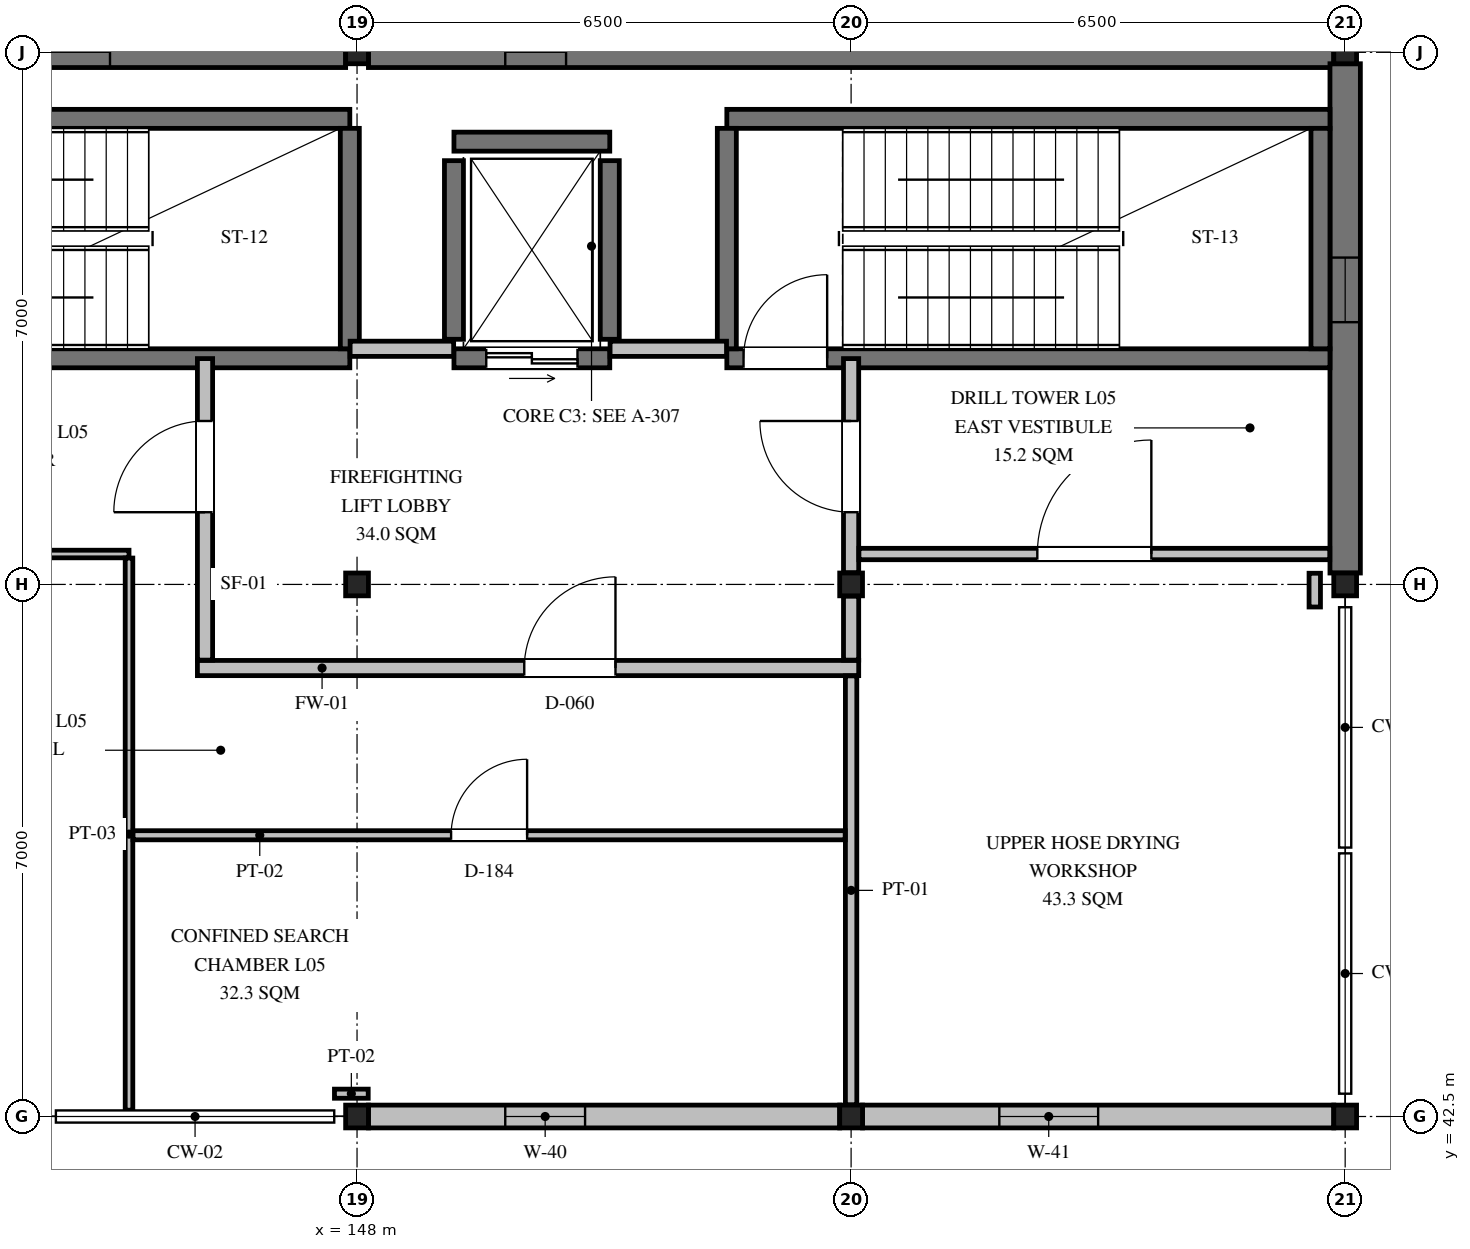
"""IFC4 building model, lengths in metres.
Left out: names, types, materials, properties, quantities, classifications, styles, units other than length and angle.
Written with IfcOpenShell. Run it as: python <this file> out.ifc"""

import sys

from ifc_helpers import new_model, si_unit, direction, frame, frame_2d, origin, origin_2d, place, context, subcontext, project, spatial, rectangle, i_section, extrude, element, fill, save


model = new_model("IFC4")
c1 = context("Model", 3, precision=1e-05, world=origin(), true_north=direction((0.0, 1.0)))
c2 = subcontext(c1, "Body", "Model", "MODEL_VIEW")
j1 = project(units=[si_unit("LENGTHUNIT", "METRE"), si_unit("PLANEANGLEUNIT", "RADIAN")], contexts=[c1])
p1 = place(None, origin())
s1 = spatial("IfcSite", under=j1, at=p1, CompositionType="ELEMENT")
p2 = place(p1, origin())
s2 = spatial("IfcBuilding", under=s1, at=p2, CompositionType="ELEMENT")
p3 = place(p2, frame((0.0, 0.0, 18.45)))
s3 = spatial("IfcBuildingStorey", under=s2, at=p3, CompositionType="ELEMENT", Elevation=18.45)
for number, where, z_axis, x_axis in (
    (1, (148.0, 42.5, 0.0), (0.0, 0.0, 1.0), (1.0, 0.0, 0.0)),
    (2, (148.0, 49.5, 0.0), (0.0, 0.0, 1.0), (1.0, 0.0, 0.0)),
    (3, (148.0, 56.5, 0.0), (0.0, 0.0, 1.0), (1.0, 0.0, 0.0)),
    (4, (154.5, 42.5, 0.0), (0.0, 0.0, 1.0), (1.0, 0.0, 0.0)),
    (5, (154.5, 49.5, 0.0), (0.0, 0.0, 1.0), (1.0, 0.0, 0.0)),
    (6, (161.0, 42.5, 0.0), (0.0, 0.0, 1.0), (1.0, 0.0, 0.0)),
    (7, (161.0, 49.5, 0.0), (0.0, 0.0, 1.0), (1.0, 0.0, 0.0)),
    (8, (161.0, 56.5, 0.0), (0.0, 0.0, 1.0), (1.0, 0.0, 0.0)),
):
    element("IfcColumn", number, at=place(p3, frame(where, z_axis=z_axis, x_axis=x_axis)), inside=s3, PredefinedType="COLUMN", context=c2, shape_type="SweptSolid", body=[
        extrude(i_section(OverallWidth=0.3, OverallDepth=0.3, WebThickness=0.01, FlangeThickness=0.015, FilletRadius=0.018, at=origin_2d()), origin(), (0.0, 0.0, 1.0), 4.2),
    ])
p4 = place(p3, frame((140.15, 56.5, 0.0), z_axis=(0.0, 0.0, 1.0), x_axis=(1.0, 0.0, 0.0)))
e9 = element("IfcWall", 9, at=p4, inside=s3, PredefinedType="SHEAR", context=c2, shape_type="SweptSolid", body=[
    extrude(rectangle(XDim=7.7, YDim=0.4, at=frame_2d((3.85, 0.0))), origin(), (0.0, 0.0, 1.0), 4.0),
])
p5 = place(p4, frame((1.8, 0.0, 0.9)))
e10 = element("IfcOpeningElement", 10, at=p5, cuts=e9, PredefinedType="OPENING", context=c2, shape_type="SweptSolid", body=[
    extrude(rectangle(XDim=2.8, YDim=1.2, at=frame_2d((1.4, 0.6))), frame((0.0, 0.21, 0.0), z_axis=(0.0, -1.0, 0.0), x_axis=(1.0, 0.0, 0.0)), (0.0, 0.0, 1.0), 0.42),
])
p6 = place(p3, frame((148.15, 56.5, 0.0), z_axis=(0.0, 0.0, 1.0), x_axis=(1.0, 0.0, 0.0)))
e11 = element("IfcWall", 11, at=p6, inside=s3, PredefinedType="SHEAR", context=c2, shape_type="SweptSolid", body=[
    extrude(rectangle(XDim=12.7, YDim=0.4, at=frame_2d((6.35, 0.0))), origin(), (0.0, 0.0, 1.0), 4.0),
])
p7 = place(p6, frame((1.8, 0.0, 0.9)))
e12 = element("IfcOpeningElement", 12, at=p7, cuts=e11, PredefinedType="OPENING", context=c2, shape_type="SweptSolid", body=[
    extrude(rectangle(XDim=0.8, YDim=1.3, at=frame_2d((0.4, 0.65))), frame((0.0, 0.21, 0.0), z_axis=(0.0, -1.0, 0.0), x_axis=(1.0, 0.0, 0.0)), (0.0, 0.0, 1.0), 0.42),
])
p8 = place(p3, frame((161.0, 49.65, 0.0), z_axis=(0.0, 0.0, 1.0), x_axis=(0.0, 1.0, 0.0)))
e13 = element("IfcWall", 13, at=p8, inside=s3, PredefinedType="SHEAR", context=c2, shape_type="SweptSolid", body=[
    extrude(rectangle(XDim=6.7, YDim=0.4, at=frame_2d((3.35, 0.0))), origin(), (0.0, 0.0, 1.0), 4.0),
])
p9 = place(p8, frame((3.3, 0.0, 1.1)))
e14 = element("IfcOpeningElement", 14, at=p9, cuts=e13, PredefinedType="OPENING", context=c2, shape_type="SweptSolid", body=[
    extrude(rectangle(XDim=0.85, YDim=0.85, at=frame_2d((0.425, 0.425))), frame((0.0, 0.21, 0.0), z_axis=(0.0, -1.0, 0.0), x_axis=(1.0, 0.0, 0.0)), (0.0, 0.0, 1.0), 0.42),
])
p10 = place(p3, frame((148.15, 42.5, 0.0), z_axis=(0.0, 0.0, 1.0), x_axis=(1.0, 0.0, 0.0)))
e15 = element("IfcWall", 15, at=p10, inside=s3, PredefinedType="SOLIDWALL", context=c2, shape_type="SweptSolid", body=[
    extrude(rectangle(XDim=6.2, YDim=0.3, at=frame_2d((3.1, 0.0))), origin(), (0.0, 0.0, 1.0), 3.494),
])
p11 = place(p10, frame((1.8, 0.0, 0.9)))
e16 = element("IfcOpeningElement", 16, at=p11, cuts=e15, PredefinedType="OPENING", context=c2, shape_type="SweptSolid", body=[
    extrude(rectangle(XDim=1.05, YDim=1.3, at=frame_2d((0.525, 0.65))), frame((0.0, 0.16, 0.0), z_axis=(0.0, -1.0, 0.0), x_axis=(1.0, 0.0, 0.0)), (0.0, 0.0, 1.0), 0.32),
])
p12 = place(p3, frame((154.65, 42.5, 0.0), z_axis=(0.0, 0.0, 1.0), x_axis=(1.0, 0.0, 0.0)))
e17 = element("IfcWall", 17, at=p12, inside=s3, PredefinedType="SOLIDWALL", context=c2, shape_type="SweptSolid", body=[
    extrude(rectangle(XDim=6.2, YDim=0.3, at=frame_2d((3.1, 0.0))), origin(), (0.0, 0.0, 1.0), 3.554),
])
p13 = place(p12, frame((1.8, 0.0, 0.9)))
e18 = element("IfcOpeningElement", 18, at=p13, cuts=e17, PredefinedType="OPENING", context=c2, shape_type="SweptSolid", body=[
    extrude(rectangle(XDim=1.3, YDim=1.3, at=frame_2d((0.65, 0.65))), frame((0.0, 0.16, 0.0), z_axis=(0.0, -1.0, 0.0), x_axis=(1.0, 0.0, 0.0)), (0.0, 0.0, 1.0), 0.32),
])
p14 = place(p3, frame((140.095, 52.475, 0.0), z_axis=(0.0, 0.0, 1.0), x_axis=(1.0, 0.0, 0.0)))
e19 = element("IfcWall", 19, at=p14, inside=s3, PredefinedType="SHEAR", context=c2, shape_type="SweptSolid", body=[
    extrude(rectangle(XDim=7.81, YDim=0.25, at=frame_2d((3.905, 0.0))), origin(), (0.0, 0.0, 1.0), 4.0),
])
p15 = place(p14, frame((0.22, 0.0, 0.0)))
e20 = element("IfcOpeningElement", 20, at=p15, cuts=e19, PredefinedType="OPENING", context=c2, shape_type="SweptSolid", body=[
    extrude(rectangle(XDim=1.1, YDim=2.15, at=frame_2d((0.55, 1.075))), frame((0.0, 0.135, 0.0), z_axis=(0.0, -1.0, 0.0), x_axis=(1.0, 0.0, 0.0)), (0.0, 0.0, 1.0), 0.27),
])
p16 = place(p3, frame((140.095, 55.625, 0.0), z_axis=(0.0, 0.0, 1.0), x_axis=(1.0, 0.0, 0.0)))
e21 = element("IfcWall", 21, at=p16, inside=s3, PredefinedType="SHEAR", context=c2, shape_type="SweptSolid", body=[
    extrude(rectangle(XDim=7.81, YDim=0.25, at=frame_2d((3.905, 0.0))), origin(), (0.0, 0.0, 1.0), 4.0),
])
p17 = place(p3, frame((147.905, 52.6, 0.0), z_axis=(0.0, 0.0, 1.0), x_axis=(0.0, 1.0, 0.0)))
e22 = element("IfcWall", 22, at=p17, inside=s3, PredefinedType="SHEAR", context=c2, shape_type="SweptSolid", body=[
    extrude(rectangle(XDim=2.9, YDim=0.25, at=frame_2d((1.45, 0.0))), origin(), (0.0, 0.0, 1.0), 4.0),
])
p18 = place(p3, frame((152.865, 52.475, 0.0), z_axis=(0.0, 0.0, 1.0), x_axis=(1.0, 0.0, 0.0)))
e23 = element("IfcWall", 23, at=p18, inside=s3, PredefinedType="SHEAR", context=c2, shape_type="SweptSolid", body=[
    extrude(rectangle(XDim=7.935, YDim=0.25, at=frame_2d((3.968, 0.0))), origin(), (0.0, 0.0, 1.0), 4.0),
])
p19 = place(p18, frame((0.22, 0.0, 0.0)))
e24 = element("IfcOpeningElement", 24, at=p19, cuts=e23, PredefinedType="OPENING", context=c2, shape_type="SweptSolid", body=[
    extrude(rectangle(XDim=1.1, YDim=2.15, at=frame_2d((0.55, 1.075))), frame((0.0, 0.135, 0.0), z_axis=(0.0, -1.0, 0.0), x_axis=(1.0, 0.0, 0.0)), (0.0, 0.0, 1.0), 0.27),
])
p20 = place(p3, frame((152.865, 55.625, 0.0), z_axis=(0.0, 0.0, 1.0), x_axis=(1.0, 0.0, 0.0)))
e25 = element("IfcWall", 25, at=p20, inside=s3, PredefinedType="SHEAR", context=c2, shape_type="SweptSolid", body=[
    extrude(rectangle(XDim=7.935, YDim=0.25, at=frame_2d((3.968, 0.0))), origin(), (0.0, 0.0, 1.0), 4.0),
])
for number, where, z_axis, x_axis in (
    (26, (152.865, 52.6, 0.0), (0.0, 0.0, 1.0), (0.0, 1.0, 0.0)),
    (27, (160.675, 52.6, 0.0), (0.0, 0.0, 1.0), (0.0, 1.0, 0.0)),
):
    element("IfcWall", number, at=place(p3, frame(where, z_axis=z_axis, x_axis=x_axis)), inside=s3, PredefinedType="SHEAR", context=c2, shape_type="SweptSolid", body=[
        extrude(rectangle(XDim=2.9, YDim=0.25, at=frame_2d((1.45, 0.0))), origin(), (0.0, 0.0, 1.0), 4.0),
    ])
p21 = place(p3, frame((149.275, 52.475, 0.0), z_axis=(0.0, 0.0, 1.0), x_axis=(1.0, 0.0, 0.0)))
e28 = element("IfcWall", 28, at=p21, inside=s3, PredefinedType="SHEAR", context=c2, shape_type="SweptSolid", body=[
    extrude(rectangle(XDim=2.05, YDim=0.25, at=frame_2d((1.025, 0.0))), origin(), (0.0, 0.0, 1.0), 4.0),
])
p22 = place(p21, frame((0.425, 0.0, 0.0)))
e29 = element("IfcOpeningElement", 29, at=p22, cuts=e28, PredefinedType="OPENING", context=c2, shape_type="SweptSolid", body=[
    extrude(rectangle(XDim=1.2, YDim=2.15, at=frame_2d((0.6, 1.075))), frame((0.0, 0.135, 0.0), z_axis=(0.0, -1.0, 0.0), x_axis=(1.0, 0.0, 0.0)), (0.0, 0.0, 1.0), 0.27),
])
p23 = place(p3, frame((149.275, 55.325, 0.0), z_axis=(0.0, 0.0, 1.0), x_axis=(1.0, 0.0, 0.0)))
e30 = element("IfcWall", 30, at=p23, inside=s3, PredefinedType="SHEAR", context=c2, shape_type="SweptSolid", body=[
    extrude(rectangle(XDim=2.05, YDim=0.25, at=frame_2d((1.025, 0.0))), origin(), (0.0, 0.0, 1.0), 4.0),
])
for number, where, z_axis, x_axis in (
    (31, (149.275, 52.725, 0.0), (0.0, 0.0, 1.0), (0.0, 1.0, 0.0)),
    (32, (151.325, 52.725, 0.0), (0.0, 0.0, 1.0), (0.0, 1.0, 0.0)),
):
    element("IfcWall", number, at=place(p3, frame(where, z_axis=z_axis, x_axis=x_axis)), inside=s3, PredefinedType="SHEAR", context=c2, shape_type="SweptSolid", body=[
        extrude(rectangle(XDim=2.35, YDim=0.25, at=frame_2d((1.175, 0.0))), origin(), (0.0, 0.0, 1.0), 4.0),
    ])
p24 = place(p3, frame((147.909, 52.6, 0.0), z_axis=(0.0, 0.0, 1.0), x_axis=(1.0, 0.0, 0.0)))
e33 = element("IfcWall", 33, at=p24, inside=s3, PredefinedType="PARTITIONING", context=c2, shape_type="SweptSolid", body=[
    extrude(rectangle(XDim=1.362, YDim=0.2, at=frame_2d((0.681, 0.0))), origin(), (0.0, 0.0, 1.0), 4.0),
])
p25 = place(p3, frame((151.329, 52.6, 0.0), z_axis=(0.0, 0.0, 1.0), x_axis=(1.0, 0.0, 0.0)))
e34 = element("IfcWall", 34, at=p25, inside=s3, PredefinedType="PARTITIONING", context=c2, shape_type="SweptSolid", body=[
    extrude(rectangle(XDim=1.532, YDim=0.2, at=frame_2d((0.766, 0.0))), origin(), (0.0, 0.0, 1.0), 4.0),
])
p26 = place(p3, frame((145.9, 48.4, 0.0), z_axis=(0.0, 0.0, 1.0), x_axis=(1.0, 0.0, 0.0)))
e35 = element("IfcWall", 35, at=p26, inside=s3, PredefinedType="PARTITIONING", context=c2, shape_type="SweptSolid", body=[
    extrude(rectangle(XDim=8.7, YDim=0.2, at=frame_2d((4.35, 0.0))), origin(), (0.0, 0.0, 1.0), 4.0),
])
p27 = place(p26, frame((4.3, 0.0, 0.0)))
e36 = element("IfcOpeningElement", 36, at=p27, cuts=e35, PredefinedType="OPENING", context=c2, shape_type="SweptSolid", body=[
    extrude(rectangle(XDim=1.2, YDim=2.15, at=frame_2d((0.6, 1.075))), frame((0.0, 0.11, 0.0), z_axis=(0.0, -1.0, 0.0), x_axis=(1.0, 0.0, 0.0)), (0.0, 0.0, 1.0), 0.22),
])
p28 = place(p3, frame((146.0, 48.504, 0.0), z_axis=(0.0, 0.0, 1.0), x_axis=(0.0, 1.0, 0.0)))
e37 = element("IfcWall", 37, at=p28, inside=s3, PredefinedType="PARTITIONING", context=c2, shape_type="SweptSolid", body=[
    extrude(rectangle(XDim=3.967, YDim=0.2, at=frame_2d((1.983, 0.0))), origin(), (0.0, 0.0, 1.0), 4.0),
])
p29 = place(p28, frame((1.946, 0.0, 0.0)))
e38 = element("IfcOpeningElement", 38, at=p29, cuts=e37, PredefinedType="OPENING", context=c2, shape_type="SweptSolid", body=[
    extrude(rectangle(XDim=1.2, YDim=2.15, at=frame_2d((0.6, 1.075))), frame((0.0, 0.11, 0.0), z_axis=(0.0, -1.0, 0.0), x_axis=(1.0, 0.0, 0.0)), (0.0, 0.0, 1.0), 0.22),
])
p30 = place(p3, frame((154.5, 48.504, 0.0), z_axis=(0.0, 0.0, 1.0), x_axis=(0.0, 1.0, 0.0)))
e39 = element("IfcWall", 39, at=p30, inside=s3, PredefinedType="PARTITIONING", context=c2, shape_type="SweptSolid", body=[
    extrude(rectangle(XDim=0.842, YDim=0.2, at=frame_2d((0.421, 0.0))), origin(), (0.0, 0.0, 1.0), 3.604),
])
p31 = place(p3, frame((154.5, 49.654, 0.0), z_axis=(0.0, 0.0, 1.0), x_axis=(0.0, 1.0, 0.0)))
e40 = element("IfcWall", 40, at=p31, inside=s3, PredefinedType="PARTITIONING", context=c2, shape_type="SweptSolid", body=[
    extrude(rectangle(XDim=2.817, YDim=0.2, at=frame_2d((1.408, 0.0))), origin(), (0.0, 0.0, 1.0), 4.0),
])
p32 = place(p31, frame((0.796, 0.0, 0.0)))
e41 = element("IfcOpeningElement", 41, at=p32, cuts=e40, PredefinedType="OPENING", context=c2, shape_type="SweptSolid", body=[
    extrude(rectangle(XDim=1.2, YDim=2.15, at=frame_2d((0.6, 1.075))), frame((0.0, 0.11, 0.0), z_axis=(0.0, -1.0, 0.0), x_axis=(1.0, 0.0, 0.0)), (0.0, 0.0, 1.0), 0.22),
])
p33 = place(p3, frame((132.153, 49.9, 0.0), z_axis=(0.0, 0.0, 1.0), x_axis=(1.0, 0.0, 0.0)))
e42 = element("IfcWall", 42, at=p33, inside=s3, PredefinedType="PARTITIONING", context=c2, shape_type="SweptSolid", body=[
    extrude(rectangle(XDim=12.847, YDim=0.1, at=frame_2d((6.423, 0.0))), origin(), (0.0, 0.0, 1.0), 4.0),
])
p34 = place(p33, frame((5.924, 0.0, 0.0)))
e43 = element("IfcOpeningElement", 43, at=p34, cuts=e42, PredefinedType="OPENING", context=c2, shape_type="SweptSolid", body=[
    extrude(rectangle(XDim=1.0, YDim=2.1, at=frame_2d((0.5, 1.05))), frame((0.0, 0.06, 0.0), z_axis=(0.0, -1.0, 0.0), x_axis=(1.0, 0.0, 0.0)), (0.0, 0.0, 1.0), 0.12),
])
p35 = place(p3, frame((145.0, 42.583, 0.0), z_axis=(0.0, 0.0, 1.0), x_axis=(0.0, 1.0, 0.0)))
e44 = element("IfcWall", 44, at=p35, inside=s3, PredefinedType="PARTITIONING", context=c2, shape_type="SweptSolid", body=[
    extrude(rectangle(XDim=7.264, YDim=0.1, at=frame_2d((3.632, 0.0))), origin(), (0.0, 0.0, 1.0), 4.0),
])
p36 = place(p3, frame((154.603, 49.9, 0.0), z_axis=(0.0, 0.0, 1.0), x_axis=(1.0, 0.0, 0.0)))
e45 = element("IfcWall", 45, at=p36, inside=s3, PredefinedType="PARTITIONING", context=c2, shape_type="SweptSolid", body=[
    extrude(rectangle(XDim=6.194, YDim=0.15, at=frame_2d((3.097, 0.0))), origin(), (0.0, 0.0, 1.0), 4.0),
])
p37 = place(p36, frame((2.347, 0.0, 0.0)))
e46 = element("IfcOpeningElement", 46, at=p37, cuts=e45, PredefinedType="OPENING", context=c2, shape_type="SweptSolid", body=[
    extrude(rectangle(XDim=1.5, YDim=2.25, at=frame_2d((0.75, 1.125))), frame((0.0, 0.085, 0.0), z_axis=(0.0, -1.0, 0.0), x_axis=(1.0, 0.0, 0.0)), (0.0, 0.0, 1.0), 0.17),
])
p38 = place(p3, frame((154.5, 42.653, 0.0), z_axis=(0.0, 0.0, 1.0), x_axis=(0.0, 1.0, 0.0)))
e47 = element("IfcWall", 47, at=p38, inside=s3, PredefinedType="PARTITIONING", context=c2, shape_type="SweptSolid", body=[
    extrude(rectangle(XDim=5.644, YDim=0.15, at=frame_2d((2.822, 0.0))), origin(), (0.0, 0.0, 1.0), 3.604),
])
p39 = place(p3, frame((160.6, 49.203, 0.0), z_axis=(0.0, 0.0, 1.0), x_axis=(0.0, 1.0, 0.0)))
e48 = element("IfcWall", 48, at=p39, inside=s3, PredefinedType="PARTITIONING", context=c2, shape_type="SweptSolid", body=[
    extrude(rectangle(XDim=0.444, YDim=0.15, at=frame_2d((0.222, 0.0))), origin(), (0.0, 0.0, 1.0), 4.0),
])
p40 = place(p3, frame((147.703, 42.8, 0.0), z_axis=(0.0, 0.0, 1.0), x_axis=(1.0, 0.0, 0.0)))
e49 = element("IfcWall", 49, at=p40, inside=s3, PredefinedType="PARTITIONING", context=c2, shape_type="SweptSolid", body=[
    extrude(rectangle(XDim=0.444, YDim=0.12, at=frame_2d((0.222, 0.0))), origin(), (0.0, 0.0, 1.0), 4.0),
])
p41 = place(p3, frame((145.053, 46.2, 0.0), z_axis=(0.0, 0.0, 1.0), x_axis=(1.0, 0.0, 0.0)))
e50 = element("IfcWall", 50, at=p41, inside=s3, PredefinedType="PARTITIONING", context=c2, shape_type="SweptSolid", body=[
    extrude(rectangle(XDim=9.369, YDim=0.12, at=frame_2d((4.685, 0.0))), origin(), (0.0, 0.0, 1.0), 4.0),
])
p42 = place(p41, frame((4.185, 0.0, 0.0)))
e51 = element("IfcOpeningElement", 51, at=p42, cuts=e50, PredefinedType="OPENING", context=c2, shape_type="SweptSolid", body=[
    extrude(rectangle(XDim=1.0, YDim=2.1, at=frame_2d((0.5, 1.05))), frame((0.0, 0.07, 0.0), z_axis=(0.0, -1.0, 0.0), x_axis=(1.0, 0.0, 0.0)), (0.0, 0.0, 1.0), 0.14),
])
p43 = place(p5, origin())
e52 = element("IfcWindow", 52, at=p43, inside=s3, PartitioningType="SINGLE_PANEL", PredefinedType="WINDOW", context=c2, shape_type="SweptSolid", body=[
    extrude(rectangle(XDim=2.8, YDim=1.2, at=frame_2d((1.4, 0.6))), frame((0.0, 0.03, 0.0), z_axis=(0.0, -1.0, 0.0), x_axis=(1.0, 0.0, 0.0)), (0.0, 0.0, 1.0), 0.06),
])
fill(e10, e52)
p44 = place(p7, origin())
e53 = element("IfcWindow", 53, at=p44, inside=s3, PartitioningType="SINGLE_PANEL", PredefinedType="WINDOW", context=c2, shape_type="SweptSolid", body=[
    extrude(rectangle(XDim=0.8, YDim=1.3, at=frame_2d((0.4, 0.65))), frame((0.0, 0.03, 0.0), z_axis=(0.0, -1.0, 0.0), x_axis=(1.0, 0.0, 0.0)), (0.0, 0.0, 1.0), 0.06),
])
fill(e12, e53)
p45 = place(p9, origin())
e54 = element("IfcWindow", 54, at=p45, inside=s3, PartitioningType="SINGLE_PANEL", PredefinedType="WINDOW", context=c2, shape_type="SweptSolid", body=[
    extrude(rectangle(XDim=0.85, YDim=0.85, at=frame_2d((0.425, 0.425))), frame((0.0, 0.03, 0.0), z_axis=(0.0, -1.0, 0.0), x_axis=(1.0, 0.0, 0.0)), (0.0, 0.0, 1.0), 0.06),
])
fill(e14, e54)
p46 = place(p11, origin())
e55 = element("IfcWindow", 55, at=p46, inside=s3, PartitioningType="SINGLE_PANEL", PredefinedType="WINDOW", context=c2, shape_type="SweptSolid", body=[
    extrude(rectangle(XDim=1.05, YDim=1.3, at=frame_2d((0.525, 0.65))), frame((0.0, 0.03, 0.0), z_axis=(0.0, -1.0, 0.0), x_axis=(1.0, 0.0, 0.0)), (0.0, 0.0, 1.0), 0.06),
])
fill(e16, e55)
p47 = place(p13, origin())
e56 = element("IfcWindow", 56, at=p47, inside=s3, PartitioningType="SINGLE_PANEL", PredefinedType="WINDOW", context=c2, shape_type="SweptSolid", body=[
    extrude(rectangle(XDim=1.3, YDim=1.3, at=frame_2d((0.65, 0.65))), frame((0.0, 0.03, 0.0), z_axis=(0.0, -1.0, 0.0), x_axis=(1.0, 0.0, 0.0)), (0.0, 0.0, 1.0), 0.06),
])
fill(e18, e56)
p48 = place(p19, frame((1.1, 0.0, 0.0), z_axis=(0.0, 0.0, 1.0), x_axis=(-1.0, 0.0, 0.0)))
e57 = element("IfcDoor", 57, at=p48, inside=s3, OperationType="SINGLE_SWING_RIGHT", PredefinedType="DOOR", context=c2, shape_type="SweptSolid", body=[
    extrude(rectangle(XDim=1.1, YDim=2.15, at=frame_2d((0.55, 1.075))), frame((0.0, 0.025, 0.0), z_axis=(0.0, -1.0, 0.0), x_axis=(1.0, 0.0, 0.0)), (0.0, 0.0, 1.0), 0.05),
])
fill(e24, e57)
p49 = place(p22, origin())
e58 = element("IfcDoor", 58, at=p49, inside=s3, OperationType="DOUBLE_DOOR_SLIDING", PredefinedType="DOOR", context=c2, shape_type="SweptSolid", body=[
    extrude(rectangle(XDim=1.2, YDim=2.15, at=frame_2d((0.6, 1.075))), frame((0.0, 0.025, 0.0), z_axis=(0.0, -1.0, 0.0), x_axis=(1.0, 0.0, 0.0)), (0.0, 0.0, 1.0), 0.05),
])
fill(e29, e58)
p50 = place(p27, origin())
e59 = element("IfcDoor", 59, at=p50, inside=s3, OperationType="SINGLE_SWING_RIGHT", PredefinedType="DOOR", context=c2, shape_type="SweptSolid", body=[
    extrude(rectangle(XDim=1.2, YDim=2.15, at=frame_2d((0.6, 1.075))), frame((0.0, 0.025, 0.0), z_axis=(0.0, -1.0, 0.0), x_axis=(1.0, 0.0, 0.0)), (0.0, 0.0, 1.0), 0.05),
])
fill(e36, e59)
p51 = place(p29, origin())
e60 = element("IfcDoor", 60, at=p51, inside=s3, OperationType="SINGLE_SWING_LEFT", PredefinedType="DOOR", context=c2, shape_type="SweptSolid", body=[
    extrude(rectangle(XDim=1.2, YDim=2.15, at=frame_2d((0.6, 1.075))), frame((0.0, 0.025, 0.0), z_axis=(0.0, -1.0, 0.0), x_axis=(1.0, 0.0, 0.0)), (0.0, 0.0, 1.0), 0.05),
])
fill(e38, e60)
p52 = place(p32, origin())
e61 = element("IfcDoor", 61, at=p52, inside=s3, OperationType="SINGLE_SWING_RIGHT", PredefinedType="DOOR", context=c2, shape_type="SweptSolid", body=[
    extrude(rectangle(XDim=1.2, YDim=2.15, at=frame_2d((0.6, 1.075))), frame((0.0, 0.025, 0.0), z_axis=(0.0, -1.0, 0.0), x_axis=(1.0, 0.0, 0.0)), (0.0, 0.0, 1.0), 0.05),
])
fill(e41, e61)
p53 = place(p37, origin())
e62 = element("IfcDoor", 62, at=p53, inside=s3, OperationType="SINGLE_SWING_RIGHT", PredefinedType="DOOR", context=c2, shape_type="SweptSolid", body=[
    extrude(rectangle(XDim=1.5, YDim=2.25, at=frame_2d((0.75, 1.125))), frame((0.0, 0.025, 0.0), z_axis=(0.0, -1.0, 0.0), x_axis=(1.0, 0.0, 0.0)), (0.0, 0.0, 1.0), 0.05),
])
fill(e46, e62)
p54 = place(p42, origin())
e63 = element("IfcDoor", 63, at=p54, inside=s3, OperationType="SINGLE_SWING_RIGHT", PredefinedType="DOOR", context=c2, shape_type="SweptSolid", body=[
    extrude(rectangle(XDim=1.0, YDim=2.1, at=frame_2d((0.5, 1.05))), frame((0.0, 0.025, 0.0), z_axis=(0.0, -1.0, 0.0), x_axis=(1.0, 0.0, 0.0)), (0.0, 0.0, 1.0), 0.05),
])
fill(e51, e63)
save(model, sys.argv[1])
